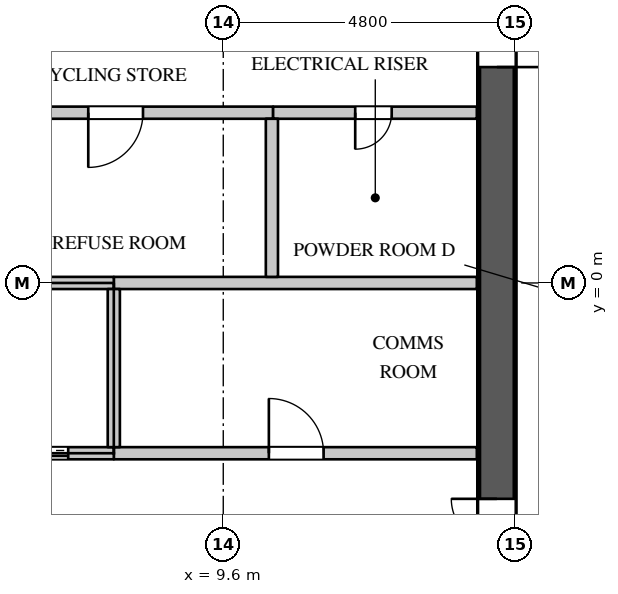
"""IFC4 building model, lengths in metres.
Left out: names, types, materials, properties, quantities, classifications, styles, units other than length and angle.
Written with IfcOpenShell. Run it as: python <this file> out.ifc"""

import sys

from ifc_helpers import new_model, si_unit, direction, frame, frame_2d, origin, place, context, subcontext, project, spatial, rectangle, extrude, element, fill, save


model = new_model("IFC4")
c1 = context("Model", 3, precision=1e-05, world=origin(), true_north=direction((0.0, 1.0)))
c2 = subcontext(c1, "Body", "Model", "MODEL_VIEW")
j1 = project(units=[si_unit("LENGTHUNIT", "METRE"), si_unit("PLANEANGLEUNIT", "RADIAN")], contexts=[c1])
p1 = place(None, origin())
s1 = spatial("IfcSite", under=j1, at=p1, CompositionType="ELEMENT")
p2 = place(p1, origin())
s2 = spatial("IfcBuilding", under=s1, at=p2, CompositionType="ELEMENT")
p3 = place(p2, frame((0.0, 0.0, 226.5)))
s3 = spatial("IfcBuildingStorey", under=s2, at=p3, CompositionType="ELEMENT", Elevation=226.5)
p4 = place(p3, frame((14.1, -11.4, 0.0), z_axis=(0.0, 0.0, 1.0), x_axis=(0.0, 1.0, 0.0)))
e1 = element("IfcWall", 1, at=p4, inside=s3, PredefinedType="SHEAR", context=c2, shape_type="SweptSolid", body=[
    extrude(rectangle(XDim=22.8, YDim=0.6, at=frame_2d((11.4, 0.0))), origin(), (0.0, 0.0, 1.0), 4.2),
])
p5 = place(p4, frame((20.45, 0.0, 0.0)))
e2 = element("IfcOpeningElement", 2, at=p5, cuts=e1, PredefinedType="OPENING", context=c2, shape_type="SweptSolid", body=[
    extrude(rectangle(XDim=1.1, YDim=2.2, at=frame_2d((0.55, 1.1))), frame((0.0, 0.31, 0.0), z_axis=(0.0, -1.0, 0.0), x_axis=(1.0, 0.0, 0.0)), (0.0, 0.0, 1.0), 0.62),
])
p6 = place(p4, frame((1.25, 0.0, 0.0)))
e3 = element("IfcOpeningElement", 3, at=p6, cuts=e1, PredefinedType="OPENING", context=c2, shape_type="SweptSolid", body=[
    extrude(rectangle(XDim=1.1, YDim=2.2, at=frame_2d((0.55, 1.1))), frame((0.0, 0.31, 0.0), z_axis=(0.0, -1.0, 0.0), x_axis=(1.0, 0.0, 0.0)), (0.0, 0.0, 1.0), 0.62),
])
p7 = place(p4, frame((14.95, 0.0, 0.0)))
e4 = element("IfcOpeningElement", 4, at=p7, cuts=e1, PredefinedType="OPENING", context=c2, shape_type="SweptSolid", body=[
    extrude(rectangle(XDim=1.5, YDim=2.4, at=frame_2d((0.75, 1.2))), frame((0.0, 0.31, 0.0), z_axis=(0.0, -1.0, 0.0), x_axis=(1.0, 0.0, 0.0)), (0.0, 0.0, 1.0), 0.62),
])
p8 = place(p4, frame((6.35, 0.0, 0.0)))
e5 = element("IfcOpeningElement", 5, at=p8, cuts=e1, PredefinedType="OPENING", context=c2, shape_type="SweptSolid", body=[
    extrude(rectangle(XDim=1.5, YDim=2.4, at=frame_2d((0.75, 1.2))), frame((0.0, 0.31, 0.0), z_axis=(0.0, -1.0, 0.0), x_axis=(1.0, 0.0, 0.0)), (0.0, 0.0, 1.0), 0.62),
])
p9 = place(p3, frame((-0.62, 2.8, 0.0), z_axis=(0.0, 0.0, 1.0), x_axis=(1.0, 0.0, 0.0)))
e6 = element("IfcWall", 6, at=p9, inside=s3, PredefinedType="PARTITIONING", context=c2, shape_type="SweptSolid", body=[
    extrude(rectangle(XDim=11.04, YDim=0.2, at=frame_2d((5.52, 0.0))), origin(), (0.0, 0.0, 1.0), 3.95),
])
p10 = place(p9, frame((1.3, 0.0, 0.0)))
e7 = element("IfcOpeningElement", 7, at=p10, cuts=e6, PredefinedType="OPENING", context=c2, shape_type="SweptSolid", body=[
    extrude(rectangle(XDim=0.9, YDim=2.2, at=frame_2d((0.45, 1.1))), frame((0.0, 0.11, 0.0), z_axis=(0.0, -1.0, 0.0), x_axis=(1.0, 0.0, 0.0)), (0.0, 0.0, 1.0), 0.22),
])
p11 = place(p9, frame((4.25, 0.0, 0.0)))
e8 = element("IfcOpeningElement", 8, at=p11, cuts=e6, PredefinedType="OPENING", context=c2, shape_type="SweptSolid", body=[
    extrude(rectangle(XDim=0.9, YDim=2.2, at=frame_2d((0.45, 1.1))), frame((0.0, 0.11, 0.0), z_axis=(0.0, -1.0, 0.0), x_axis=(1.0, 0.0, 0.0)), (0.0, 0.0, 1.0), 0.22),
])
p12 = place(p9, frame((8.0, 0.0, 0.0)))
e9 = element("IfcOpeningElement", 9, at=p12, cuts=e6, PredefinedType="OPENING", context=c2, shape_type="SweptSolid", body=[
    extrude(rectangle(XDim=0.9, YDim=2.2, at=frame_2d((0.45, 1.1))), frame((0.0, 0.11, 0.0), z_axis=(0.0, -1.0, 0.0), x_axis=(1.0, 0.0, 0.0)), (0.0, 0.0, 1.0), 0.22),
])
p13 = place(p3, frame((7.8, -2.8, 0.0), z_axis=(0.0, 0.0, 1.0), x_axis=(1.0, 0.0, 0.0)))
e10 = element("IfcWall", 10, at=p13, inside=s3, PredefinedType="PARTITIONING", context=c2, shape_type="SweptSolid", body=[
    extrude(rectangle(XDim=5.97, YDim=0.2, at=frame_2d((2.985, 0.0))), origin(), (0.0, 0.0, 1.0), 3.95),
])
p14 = place(p13, frame((2.55, 0.0, 0.0)))
e11 = element("IfcOpeningElement", 11, at=p14, cuts=e10, PredefinedType="OPENING", context=c2, shape_type="SweptSolid", body=[
    extrude(rectangle(XDim=0.9, YDim=2.2, at=frame_2d((0.45, 1.1))), frame((0.0, 0.11, 0.0), z_axis=(0.0, -1.0, 0.0), x_axis=(1.0, 0.0, 0.0)), (0.0, 0.0, 1.0), 0.22),
])
p15 = place(p3, frame((7.8, 0.0, 0.0), z_axis=(0.0, 0.0, 1.0), x_axis=(1.0, 0.0, 0.0)))
e12 = element("IfcWall", 12, at=p15, inside=s3, PredefinedType="PARTITIONING", context=c2, shape_type="SweptSolid", body=[
    extrude(rectangle(XDim=5.97, YDim=0.2, at=frame_2d((2.985, 0.0))), origin(), (0.0, 0.0, 1.0), 3.95),
])
p16 = place(p3, frame((10.42, 2.8, 0.0), z_axis=(0.0, 0.0, 1.0), x_axis=(1.0, 0.0, 0.0)))
e13 = element("IfcWall", 13, at=p16, inside=s3, PredefinedType="PARTITIONING", context=c2, shape_type="SweptSolid", body=[
    extrude(rectangle(XDim=3.35, YDim=0.2, at=frame_2d((1.675, 0.0))), origin(), (0.0, 0.0, 1.0), 3.95),
])
p17 = place(p16, frame((1.35, 0.0, 0.0)))
e14 = element("IfcOpeningElement", 14, at=p17, cuts=e13, PredefinedType="OPENING", context=c2, shape_type="SweptSolid", body=[
    extrude(rectangle(XDim=0.6, YDim=2.0, at=frame_2d((0.3, 1.0))), frame((0.0, 0.11, 0.0), z_axis=(0.0, -1.0, 0.0), x_axis=(1.0, 0.0, 0.0)), (0.0, 0.0, 1.0), 0.22),
])
p18 = place(p3, frame((10.4, 0.1, 0.0), z_axis=(0.0, 0.0, 1.0), x_axis=(0.0, 1.0, 0.0)))
e15 = element("IfcWall", 15, at=p18, inside=s3, PredefinedType="PARTITIONING", context=c2, shape_type="SweptSolid", body=[
    extrude(rectangle(XDim=2.6, YDim=0.2, at=frame_2d((1.3, 0.0))), origin(), (0.0, 0.0, 1.0), 3.95),
])
p19 = place(p3, frame((-13.77, 0.0, 0.0), z_axis=(0.0, 0.0, 1.0), x_axis=(1.0, 0.0, 0.0)))
e16 = element("IfcWall", 16, at=p19, inside=s3, PredefinedType="PARTITIONING", context=c2, shape_type="SweptSolid", body=[
    extrude(rectangle(XDim=21.57, YDim=0.2, at=frame_2d((10.785, 0.0))), origin(), (0.0, 0.0, 1.0), 3.95),
])
p20 = place(p3, frame((-10.4, -2.8, 0.0), z_axis=(0.0, 0.0, 1.0), x_axis=(1.0, 0.0, 0.0)))
e17 = element("IfcWall", 17, at=p20, inside=s3, PredefinedType="PARTITIONING", context=c2, shape_type="SweptSolid", body=[
    extrude(rectangle(XDim=18.2, YDim=0.2, at=frame_2d((9.1, 0.0))), origin(), (0.0, 0.0, 1.0), 3.95),
])
p21 = place(p20, frame((0.75, 0.0, 0.0)))
e18 = element("IfcOpeningElement", 18, at=p21, cuts=e17, PredefinedType="OPENING", context=c2, shape_type="SweptSolid", body=[
    extrude(rectangle(XDim=1.1, YDim=2.2, at=frame_2d((0.55, 1.1))), frame((0.0, 0.11, 0.0), z_axis=(0.0, -1.0, 0.0), x_axis=(1.0, 0.0, 0.0)), (0.0, 0.0, 1.0), 0.22),
])
p22 = place(p20, frame((3.35, 0.0, 0.0)))
e19 = element("IfcOpeningElement", 19, at=p22, cuts=e17, PredefinedType="OPENING", context=c2, shape_type="SweptSolid", body=[
    extrude(rectangle(XDim=1.1, YDim=2.2, at=frame_2d((0.55, 1.1))), frame((0.0, 0.11, 0.0), z_axis=(0.0, -1.0, 0.0), x_axis=(1.0, 0.0, 0.0)), (0.0, 0.0, 1.0), 0.22),
])
p23 = place(p20, frame((5.95, 0.0, 0.0)))
e20 = element("IfcOpeningElement", 20, at=p23, cuts=e17, PredefinedType="OPENING", context=c2, shape_type="SweptSolid", body=[
    extrude(rectangle(XDim=1.1, YDim=2.2, at=frame_2d((0.55, 1.1))), frame((0.0, 0.11, 0.0), z_axis=(0.0, -1.0, 0.0), x_axis=(1.0, 0.0, 0.0)), (0.0, 0.0, 1.0), 0.22),
])
p24 = place(p20, frame((8.55, 0.0, 0.0)))
e21 = element("IfcOpeningElement", 21, at=p24, cuts=e17, PredefinedType="OPENING", context=c2, shape_type="SweptSolid", body=[
    extrude(rectangle(XDim=1.1, YDim=2.2, at=frame_2d((0.55, 1.1))), frame((0.0, 0.11, 0.0), z_axis=(0.0, -1.0, 0.0), x_axis=(1.0, 0.0, 0.0)), (0.0, 0.0, 1.0), 0.22),
])
p25 = place(p20, frame((11.15, 0.0, 0.0)))
e22 = element("IfcOpeningElement", 22, at=p25, cuts=e17, PredefinedType="OPENING", context=c2, shape_type="SweptSolid", body=[
    extrude(rectangle(XDim=1.1, YDim=2.2, at=frame_2d((0.55, 1.1))), frame((0.0, 0.11, 0.0), z_axis=(0.0, -1.0, 0.0), x_axis=(1.0, 0.0, 0.0)), (0.0, 0.0, 1.0), 0.22),
])
p26 = place(p20, frame((13.75, 0.0, 0.0)))
e23 = element("IfcOpeningElement", 23, at=p26, cuts=e17, PredefinedType="OPENING", context=c2, shape_type="SweptSolid", body=[
    extrude(rectangle(XDim=1.1, YDim=2.2, at=frame_2d((0.55, 1.1))), frame((0.0, 0.11, 0.0), z_axis=(0.0, -1.0, 0.0), x_axis=(1.0, 0.0, 0.0)), (0.0, 0.0, 1.0), 0.22),
])
p27 = place(p20, frame((16.35, 0.0, 0.0)))
e24 = element("IfcOpeningElement", 24, at=p27, cuts=e17, PredefinedType="OPENING", context=c2, shape_type="SweptSolid", body=[
    extrude(rectangle(XDim=1.1, YDim=2.2, at=frame_2d((0.55, 1.1))), frame((0.0, 0.11, 0.0), z_axis=(0.0, -1.0, 0.0), x_axis=(1.0, 0.0, 0.0)), (0.0, 0.0, 1.0), 0.22),
])
p28 = place(p3, frame((7.8, -2.7, 0.0), z_axis=(0.0, 0.0, 1.0), x_axis=(0.0, 1.0, 0.0)))
e25 = element("IfcWall", 25, at=p28, inside=s3, PredefinedType="PARTITIONING", context=c2, shape_type="SweptSolid", body=[
    extrude(rectangle(XDim=2.6, YDim=0.2, at=frame_2d((1.3, 0.0))), origin(), (0.0, 0.0, 1.0), 3.95),
])
p29 = place(p17, origin())
e26 = element("IfcDoor", 26, at=p29, inside=s3, OperationType="SINGLE_SWING_RIGHT", PredefinedType="DOOR", context=c2, shape_type="SweptSolid", body=[
    extrude(rectangle(XDim=0.6, YDim=2.0, at=frame_2d((0.3, 1.0))), frame((0.0, 0.025, 0.0), z_axis=(0.0, -1.0, 0.0), x_axis=(1.0, 0.0, 0.0)), (0.0, 0.0, 1.0), 0.05),
])
fill(e14, e26)
p30 = place(p14, origin())
e27 = element("IfcDoor", 27, at=p30, inside=s3, OperationType="SINGLE_SWING_LEFT", PredefinedType="DOOR", context=c2, shape_type="SweptSolid", body=[
    extrude(rectangle(XDim=0.9, YDim=2.2, at=frame_2d((0.45, 1.1))), frame((0.0, 0.025, 0.0), z_axis=(0.0, -1.0, 0.0), x_axis=(1.0, 0.0, 0.0)), (0.0, 0.0, 1.0), 0.05),
])
fill(e11, e27)
p31 = place(p12, origin())
e28 = element("IfcDoor", 28, at=p31, inside=s3, OperationType="SINGLE_SWING_RIGHT", PredefinedType="DOOR", context=c2, shape_type="SweptSolid", body=[
    extrude(rectangle(XDim=0.9, YDim=2.2, at=frame_2d((0.45, 1.1))), frame((0.0, 0.025, 0.0), z_axis=(0.0, -1.0, 0.0), x_axis=(1.0, 0.0, 0.0)), (0.0, 0.0, 1.0), 0.05),
])
fill(e9, e28)
p32 = place(p27, origin())
e29 = element("IfcDoor", 29, at=p32, inside=s3, OperationType="DOUBLE_DOOR_SLIDING", PredefinedType="DOOR", context=c2, shape_type="SweptSolid", body=[
    extrude(rectangle(XDim=1.1, YDim=2.2, at=frame_2d((0.55, 1.1))), frame((0.0, 0.025, 0.0), z_axis=(0.0, -1.0, 0.0), x_axis=(1.0, 0.0, 0.0)), (0.0, 0.0, 1.0), 0.05),
])
fill(e24, e29)
p33 = place(p7, origin())
e30 = element("IfcDoor", 30, at=p33, inside=s3, OperationType="DOUBLE_DOOR_SINGLE_SWING", PredefinedType="DOOR", context=c2, shape_type="SweptSolid", body=[
    extrude(rectangle(XDim=1.5, YDim=2.4, at=frame_2d((0.75, 1.2))), frame((0.0, -0.245, 0.0), z_axis=(0.0, -1.0, 0.0), x_axis=(1.0, 0.0, 0.0)), (0.0, 0.0, 1.0), 0.05),
])
fill(e4, e30)
p34 = place(p8, origin())
e31 = element("IfcDoor", 31, at=p34, inside=s3, OperationType="DOUBLE_DOOR_SINGLE_SWING", PredefinedType="DOOR", context=c2, shape_type="SweptSolid", body=[
    extrude(rectangle(XDim=1.5, YDim=2.4, at=frame_2d((0.75, 1.2))), frame((0.0, 0.295, 0.0), z_axis=(0.0, -1.0, 0.0), x_axis=(1.0, 0.0, 0.0)), (0.0, 0.0, 1.0), 0.05),
])
fill(e5, e31)
save(model, sys.argv[1])
